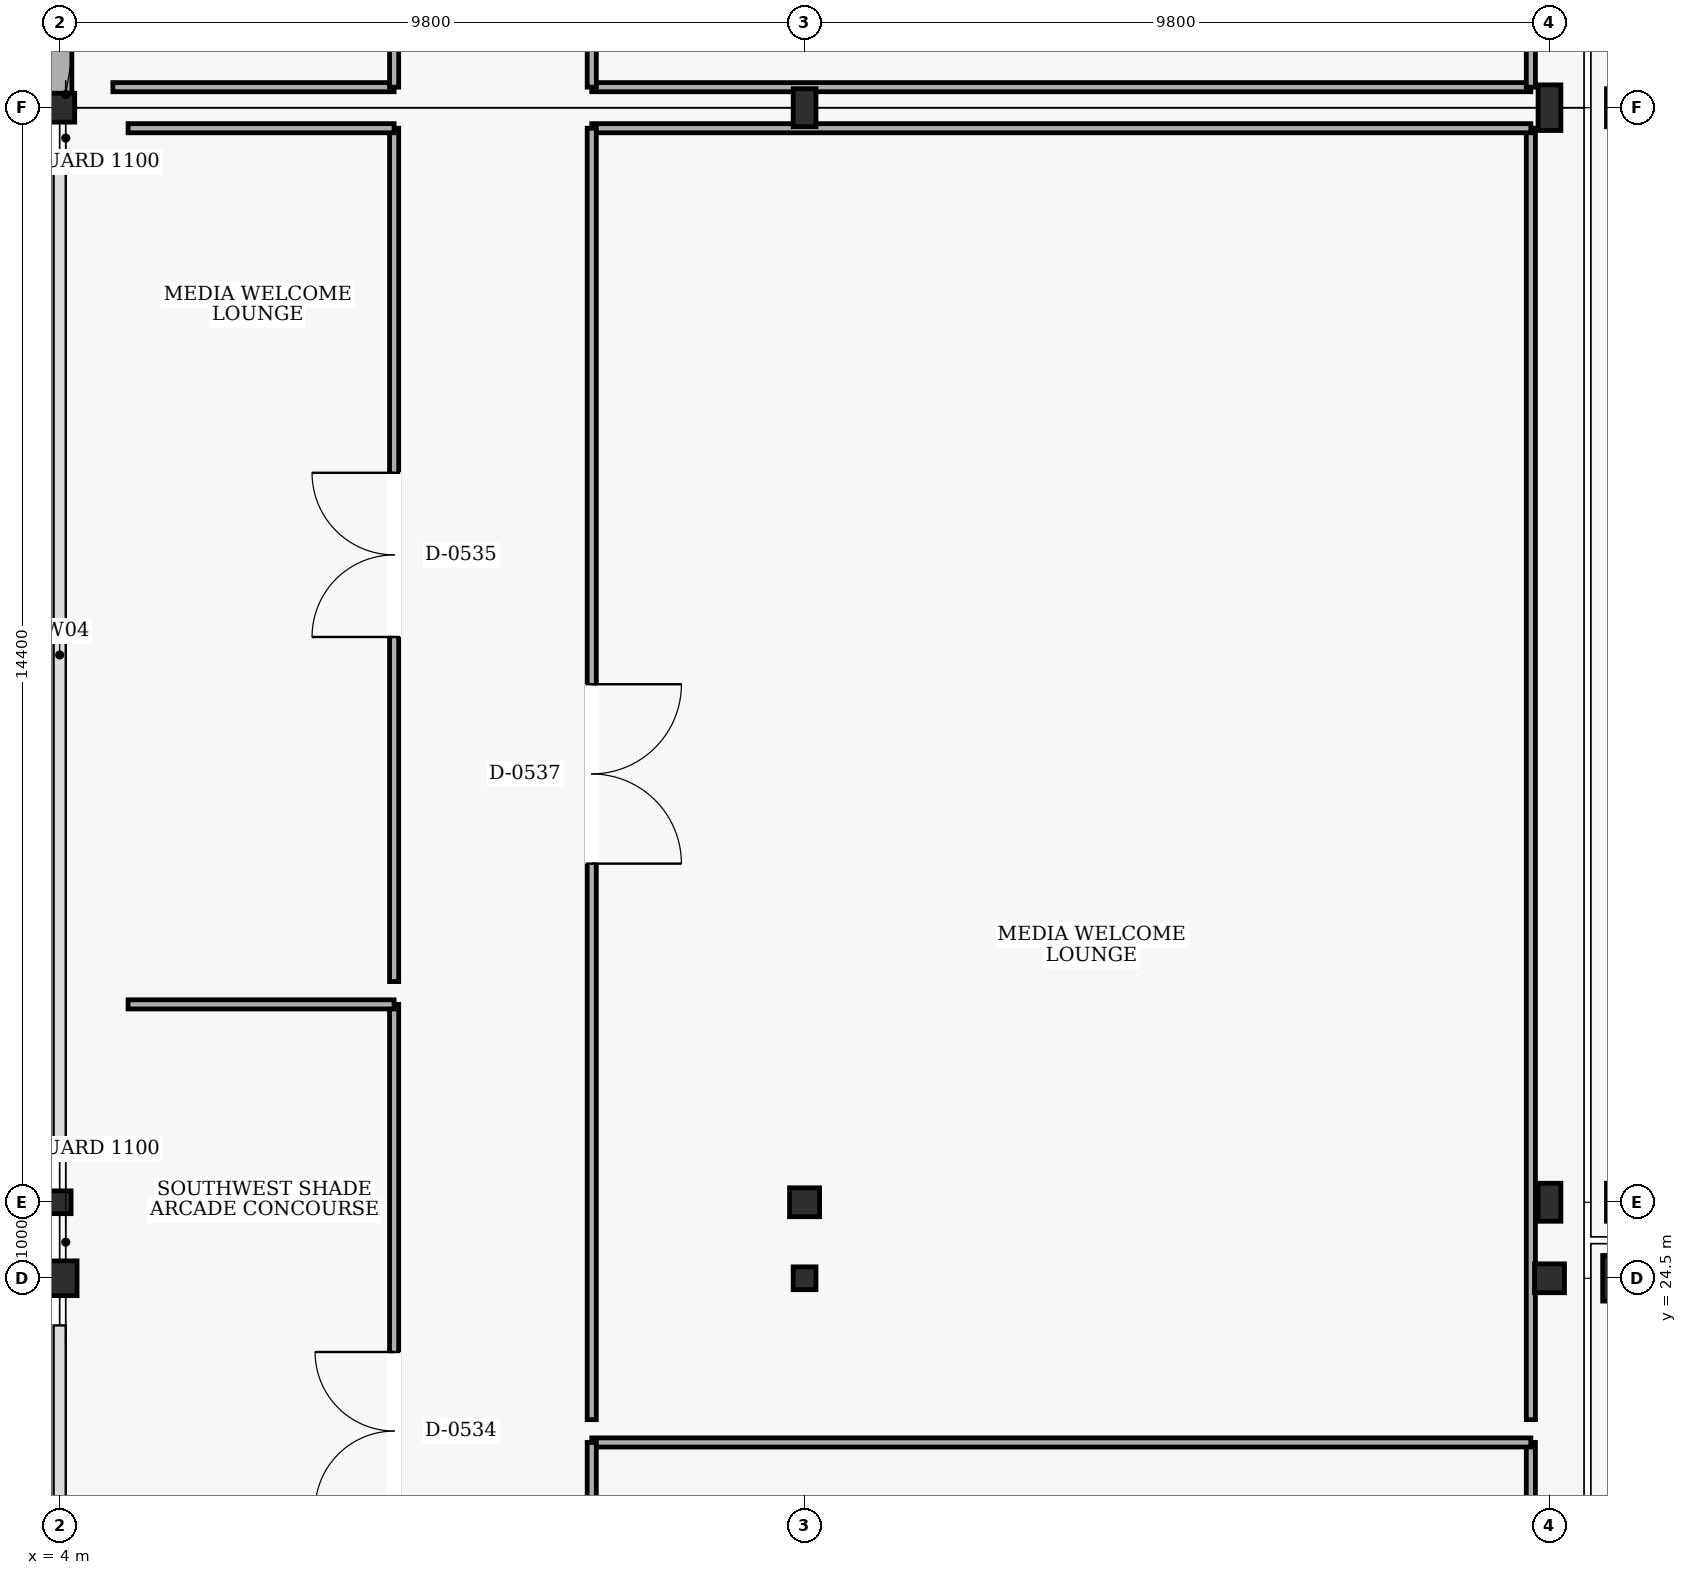
"""IFC4 building model, lengths in metres.
Left out: names, types, materials, properties, quantities, classifications, styles, units other than length and angle.
Written with IfcOpenShell. Run it as: python <this file> out.ifc"""

import sys

from ifc_helpers import new_model, si_unit, direction, frame, frame_2d, origin, origin_2d, place, context, subcontext, project, spatial, rectangle, hollow_rectangle, hollow_circle, i_section, extrude, element, fill, save


model = new_model("IFC4")
c1 = context("Model", 3, precision=1e-05, world=origin(), true_north=direction((0.0, 1.0)))
c2 = subcontext(c1, "Body", "Model", "MODEL_VIEW")
j1 = project(units=[si_unit("LENGTHUNIT", "METRE"), si_unit("PLANEANGLEUNIT", "RADIAN")], contexts=[c1])
p1 = place(None, origin())
s1 = spatial("IfcSite", under=j1, at=p1, CompositionType="ELEMENT")
p2 = place(p1, origin())
s2 = spatial("IfcBuilding", under=s1, at=p2, CompositionType="ELEMENT")
p3 = place(p2, frame((0.0, 0.0, 5.4)))
s3 = spatial("IfcBuildingStorey", under=s2, at=p3, CompositionType="ELEMENT", Elevation=5.4)
p4 = place(p3, frame((4.0, 24.5, 0.0), z_axis=(0.0, 0.0, 1.0), x_axis=(1.0, 0.0, 0.0)))
e1 = element("IfcColumn", 1, at=p4, inside=s3, PredefinedType="COLUMN", context=c2, shape_type="SweptSolid", body=[
    extrude(hollow_circle(Radius=0.229, WallThickness=0.02, at=origin_2d()), origin(), (0.0, 0.0, 1.0), 4.8),
])
p5 = place(p3, frame((4.0, 25.5, 0.0), z_axis=(0.0, 0.0, 1.0), x_axis=(1.0, 0.0, 0.0)))
e2 = element("IfcColumn", 2, at=p5, inside=s3, PredefinedType="COLUMN", context=c2, shape_type="SweptSolid", body=[
    extrude(hollow_rectangle(XDim=0.3, YDim=0.3, WallThickness=0.016, at=origin_2d()), origin(), (0.0, 0.0, 1.0), 4.8),
])
p6 = place(p3, frame((4.0, 39.9, 0.0), z_axis=(0.0, 0.0, 1.0), x_axis=(1.0, 0.0, 0.0)))
e3 = element("IfcColumn", 3, at=p6, inside=s3, PredefinedType="COLUMN", context=c2, shape_type="SweptSolid", body=[
    extrude(i_section(OverallWidth=0.395, OverallDepth=0.38, WebThickness=0.019, FlangeThickness=0.03, at=origin_2d()), origin(), (0.0, 0.0, 1.0), 4.8),
])
p7 = place(p3, frame((13.8, 24.5, 0.0), z_axis=(0.0, 0.0, 1.0), x_axis=(1.0, 0.0, 0.0)))
e4 = element("IfcColumn", 4, at=p7, inside=s3, PredefinedType="COLUMN", context=c2, shape_type="SweptSolid", body=[
    extrude(hollow_rectangle(XDim=0.3, YDim=0.3, WallThickness=0.016, at=origin_2d()), origin(), (0.0, 0.0, 1.0), 4.8),
])
p8 = place(p3, frame((13.8, 25.5, 0.0), z_axis=(0.0, 0.0, 1.0), x_axis=(1.0, 0.0, 0.0)))
e5 = element("IfcColumn", 5, at=p8, inside=s3, PredefinedType="COLUMN", context=c2, shape_type="SweptSolid", body=[
    extrude(i_section(OverallWidth=0.395, OverallDepth=0.38, WebThickness=0.019, FlangeThickness=0.03, at=origin_2d()), origin(), (0.0, 0.0, 1.0), 4.8),
])
p9 = place(p3, frame((13.8, 39.9, 0.0), z_axis=(0.0, 0.0, 1.0), x_axis=(1.0, 0.0, 0.0)))
e6 = element("IfcColumn", 6, at=p9, inside=s3, PredefinedType="COLUMN", context=c2, shape_type="SweptSolid", body=[
    extrude(i_section(OverallWidth=0.3, OverallDepth=0.5, WebThickness=0.014, FlangeThickness=0.028, at=origin_2d()), origin(), (0.0, 0.0, 1.0), 4.8),
])
p10 = place(p3, frame((23.6, 24.5, 0.0), z_axis=(0.0, 0.0, 1.0), x_axis=(1.0, 0.0, 0.0)))
e7 = element("IfcColumn", 7, at=p10, inside=s3, PredefinedType="COLUMN", context=c2, shape_type="SweptSolid", body=[
    extrude(i_section(OverallWidth=0.395, OverallDepth=0.38, WebThickness=0.019, FlangeThickness=0.03, at=origin_2d()), origin(), (0.0, 0.0, 1.0), 4.8),
])
p11 = place(p3, frame((23.6, 25.5, 0.0), z_axis=(0.0, 0.0, 1.0), x_axis=(1.0, 0.0, 0.0)))
e8 = element("IfcColumn", 8, at=p11, inside=s3, PredefinedType="COLUMN", context=c2, shape_type="SweptSolid", body=[
    extrude(i_section(OverallWidth=0.3, OverallDepth=0.5, WebThickness=0.014, FlangeThickness=0.028, at=origin_2d()), origin(), (0.0, 0.0, 1.0), 4.8),
])
p12 = place(p3, frame((23.6, 39.9, 0.0), z_axis=(0.0, 0.0, 1.0), x_axis=(1.0, 0.0, 0.0)))
e9 = element("IfcColumn", 9, at=p12, inside=s3, PredefinedType="COLUMN", context=c2, shape_type="SweptSolid", body=[
    extrude(i_section(OverallWidth=0.3, OverallDepth=0.6, WebThickness=0.015, FlangeThickness=0.03, at=origin_2d()), origin(), (0.0, 0.0, 1.0), 4.8),
])
p13 = place(p3, frame((24.6, 24.5, 0.0), z_axis=(0.0, 0.0, 1.0), x_axis=(1.0, 0.0, 0.0)))
e10 = element("IfcColumn", 10, at=p13, inside=s3, PredefinedType="COLUMN", context=c2, shape_type="SweptSolid", body=[
    extrude(rectangle(XDim=0.6, YDim=0.6, at=origin_2d()), origin(), (0.0, 0.0, 1.0), 4.8),
])
for number, where, z_axis, x_axis in (
    (11, (24.6, 25.5, 0.0), (0.0, 0.0, 1.0), (1.0, 0.0, 0.0)),
    (12, (24.6, 39.9, 0.0), (0.0, 0.0, 1.0), (1.0, 0.0, 0.0)),
):
    element("IfcColumn", number, at=place(p3, frame(where, z_axis=z_axis, x_axis=x_axis)), inside=s3, PredefinedType="COLUMN", context=c2, shape_type="SweptSolid", body=[
        extrude(rectangle(XDim=0.5, YDim=0.5, at=origin_2d()), origin(), (0.0, 0.0, 1.0), 4.8),
    ])
p14 = place(p3, frame((4.0, 40.085, 0.0), z_axis=(0.0, 0.0, 1.0), x_axis=(0.0, 1.0, 0.0)))
e13 = element("IfcWall", 13, at=p14, inside=s3, PredefinedType="SOLIDWALL", context=c2, shape_type="SweptSolid", body=[
    extrude(rectangle(XDim=6.77, YDim=0.32, at=frame_2d((3.385, 0.0))), origin(), (0.0, 0.0, 1.0), 3.78),
])
p15 = place(p14, frame((2.785, 0.0, 0.9)))
e14 = element("IfcOpeningElement", 14, at=p15, cuts=e13, PredefinedType="OPENING", context=c2, shape_type="SweptSolid", body=[
    extrude(rectangle(XDim=1.2, YDim=1.5, at=frame_2d((0.6, 0.75))), frame((0.0, 0.17, 0.0), z_axis=(0.0, -1.0, 0.0), x_axis=(1.0, 0.0, 0.0)), (0.0, 0.0, 1.0), 0.34),
])
p16 = place(p3, frame((8.4, 16.877, 0.0), z_axis=(0.0, 0.0, 1.0), x_axis=(0.0, 1.0, 0.0)))
e15 = element("IfcWall", 15, at=p16, inside=s3, PredefinedType="PARTITIONING", context=c2, shape_type="SweptSolid", body=[
    extrude(rectangle(XDim=11.227, YDim=0.12, at=frame_2d((5.613, 0.0))), origin(), (0.0, 0.0, 1.0), 4.5),
])
p17 = place(p16, frame((4.573, 0.0, 0.0)))
e16 = element("IfcOpeningElement", 16, at=p17, cuts=e15, PredefinedType="OPENING", context=c2, shape_type="SweptSolid", body=[
    extrude(rectangle(XDim=2.08, YDim=2.35, at=frame_2d((1.04, 1.175))), frame((0.0, 0.07, 0.0), z_axis=(0.0, -1.0, 0.0), x_axis=(1.0, 0.0, 0.0)), (0.0, 0.0, 1.0), 0.14),
])
p18 = place(p3, frame((8.4, 28.103, 0.0), z_axis=(0.0, 0.0, 1.0), x_axis=(-1.0, 0.0, 0.0)))
e17 = element("IfcWall", 17, at=p18, inside=s3, PredefinedType="PARTITIONING", context=c2, shape_type="SweptSolid", body=[
    extrude(rectangle(XDim=3.5, YDim=0.12, at=frame_2d((1.75, 0.0))), origin(), (0.0, 0.0, 1.0), 4.5),
])
p19 = place(p3, frame((8.4, 28.403, 0.0), z_axis=(0.0, 0.0, 1.0), x_axis=(0.0, 1.0, 0.0)))
e18 = element("IfcWall", 18, at=p19, inside=s3, PredefinedType="PARTITIONING", context=c2, shape_type="SweptSolid", body=[
    extrude(rectangle(XDim=11.227, YDim=0.12, at=frame_2d((5.613, 0.0))), origin(), (0.0, 0.0, 1.0), 4.5),
])
p20 = place(p19, frame((4.533, 0.0, 0.0)))
e19 = element("IfcOpeningElement", 19, at=p20, cuts=e18, PredefinedType="OPENING", context=c2, shape_type="SweptSolid", body=[
    extrude(rectangle(XDim=2.16, YDim=2.35, at=frame_2d((1.08, 1.175))), frame((0.0, 0.07, 0.0), z_axis=(0.0, -1.0, 0.0), x_axis=(1.0, 0.0, 0.0)), (0.0, 0.0, 1.0), 0.14),
])
p21 = place(p3, frame((8.4, 39.63, 0.0), z_axis=(0.0, 0.0, 1.0), x_axis=(-1.0, 0.0, 0.0)))
e20 = element("IfcWall", 20, at=p21, inside=s3, PredefinedType="PARTITIONING", context=c2, shape_type="SweptSolid", body=[
    extrude(rectangle(XDim=3.5, YDim=0.12, at=frame_2d((1.75, 0.0))), origin(), (0.0, 0.0, 1.0), 3.68),
])
p22 = place(p3, frame((23.355, 5.35, 0.0), z_axis=(0.0, 0.0, 1.0), x_axis=(0.0, 1.0, 0.0)))
e21 = element("IfcWall", 21, at=p22, inside=s3, PredefinedType="PARTITIONING", context=c2, shape_type="SweptSolid", body=[
    extrude(rectangle(XDim=16.99, YDim=0.12, at=frame_2d((8.495, 0.0))), origin(), (0.0, 0.0, 1.0), 3.78),
])
p23 = place(p3, frame((23.355, 22.34, 0.0), z_axis=(0.0, 0.0, 1.0), x_axis=(-1.0, 0.0, 0.0)))
e22 = element("IfcWall", 22, at=p23, inside=s3, PredefinedType="PARTITIONING", context=c2, shape_type="SweptSolid", body=[
    extrude(rectangle(XDim=12.355, YDim=0.12, at=frame_2d((6.177, 0.0))), origin(), (0.0, 0.0, 1.0), 4.5),
])
p24 = place(p3, frame((11.0, 22.34, 0.0), z_axis=(0.0, 0.0, 1.0), x_axis=(0.0, -1.0, 0.0)))
e23 = element("IfcWall", 23, at=p24, inside=s3, PredefinedType="PARTITIONING", context=c2, shape_type="SweptSolid", body=[
    extrude(rectangle(XDim=16.99, YDim=0.12, at=frame_2d((8.495, 0.0))), origin(), (0.0, 0.0, 1.0), 4.5),
])
p25 = place(p24, frame((7.355, 0.0, 0.0)))
e24 = element("IfcOpeningElement", 24, at=p25, cuts=e23, PredefinedType="OPENING", context=c2, shape_type="SweptSolid", body=[
    extrude(rectangle(XDim=2.28, YDim=2.4, at=frame_2d((1.14, 1.2))), frame((0.0, 0.07, 0.0), z_axis=(0.0, -1.0, 0.0), x_axis=(1.0, 0.0, 0.0)), (0.0, 0.0, 1.0), 0.14),
])
p26 = place(p3, frame((23.355, 22.64, 0.0), z_axis=(0.0, 0.0, 1.0), x_axis=(0.0, 1.0, 0.0)))
e25 = element("IfcWall", 25, at=p26, inside=s3, PredefinedType="PARTITIONING", context=c2, shape_type="SweptSolid", body=[
    extrude(rectangle(XDim=16.99, YDim=0.12, at=frame_2d((8.495, 0.0))), origin(), (0.0, 0.0, 1.0), 3.78),
])
p27 = place(p3, frame((23.355, 39.63, 0.0), z_axis=(0.0, 0.0, 1.0), x_axis=(-1.0, 0.0, 0.0)))
e26 = element("IfcWall", 26, at=p27, inside=s3, PredefinedType="PARTITIONING", context=c2, shape_type="SweptSolid", body=[
    extrude(rectangle(XDim=12.355, YDim=0.12, at=frame_2d((6.177, 0.0))), origin(), (0.0, 0.0, 1.0), 3.53),
])
p28 = place(p3, frame((11.0, 39.63, 0.0), z_axis=(0.0, 0.0, 1.0), x_axis=(0.0, -1.0, 0.0)))
e27 = element("IfcWall", 27, at=p28, inside=s3, PredefinedType="PARTITIONING", context=c2, shape_type="SweptSolid", body=[
    extrude(rectangle(XDim=16.99, YDim=0.12, at=frame_2d((8.495, 0.0))), origin(), (0.0, 0.0, 1.0), 4.5),
])
p29 = place(p28, frame((7.315, 0.0, 0.0)))
e28 = element("IfcOpeningElement", 28, at=p29, cuts=e27, PredefinedType="OPENING", context=c2, shape_type="SweptSolid", body=[
    extrude(rectangle(XDim=2.36, YDim=2.4, at=frame_2d((1.18, 1.2))), frame((0.0, 0.07, 0.0), z_axis=(0.0, -1.0, 0.0), x_axis=(1.0, 0.0, 0.0)), (0.0, 0.0, 1.0), 0.14),
])
p30 = place(p3, frame((4.7, 40.17, 0.0), z_axis=(0.0, 0.0, 1.0), x_axis=(1.0, 0.0, 0.0)))
e29 = element("IfcWall", 29, at=p30, inside=s3, PredefinedType="PARTITIONING", context=c2, shape_type="SweptSolid", body=[
    extrude(rectangle(XDim=3.7, YDim=0.12, at=frame_2d((1.85, 0.0))), origin(), (0.0, 0.0, 1.0), 3.68),
])
p31 = place(p3, frame((8.4, 40.17, 0.0), z_axis=(0.0, 0.0, 1.0), x_axis=(0.0, 1.0, 0.0)))
e30 = element("IfcWall", 30, at=p31, inside=s3, PredefinedType="PARTITIONING", context=c2, shape_type="SweptSolid", body=[
    extrude(rectangle(XDim=11.445, YDim=0.12, at=frame_2d((5.723, 0.0))), origin(), (0.0, 0.0, 1.0), 4.5),
])
p32 = place(p31, frame((5.262, 0.0, 0.0)))
e31 = element("IfcOpeningElement", 31, at=p32, cuts=e30, PredefinedType="OPENING", context=c2, shape_type="SweptSolid", body=[
    extrude(rectangle(XDim=0.92, YDim=2.1, at=frame_2d((0.46, 1.05))), frame((0.0, 0.07, 0.0), z_axis=(0.0, -1.0, 0.0), x_axis=(1.0, 0.0, 0.0)), (0.0, 0.0, 1.0), 0.14),
])
p33 = place(p3, frame((11.0, 40.17, 0.0), z_axis=(0.0, 0.0, 1.0), x_axis=(1.0, 0.0, 0.0)))
e32 = element("IfcWall", 32, at=p33, inside=s3, PredefinedType="PARTITIONING", context=c2, shape_type="SweptSolid", body=[
    extrude(rectangle(XDim=12.355, YDim=0.12, at=frame_2d((6.177, 0.0))), origin(), (0.0, 0.0, 1.0), 3.53),
])
p34 = place(p3, frame((23.355, 40.17, 0.0), z_axis=(0.0, 0.0, 1.0), x_axis=(0.0, 1.0, 0.0)))
e33 = element("IfcWall", 33, at=p34, inside=s3, PredefinedType="PARTITIONING", context=c2, shape_type="SweptSolid", body=[
    extrude(rectangle(XDim=11.5, YDim=0.12, at=frame_2d((5.75, 0.0))), origin(), (0.0, 0.0, 1.0), 3.78),
])
p35 = place(p3, frame((11.0, 51.67, 0.0), z_axis=(0.0, 0.0, 1.0), x_axis=(0.0, -1.0, 0.0)))
e34 = element("IfcWall", 34, at=p35, inside=s3, PredefinedType="PARTITIONING", context=c2, shape_type="SweptSolid", body=[
    extrude(rectangle(XDim=11.5, YDim=0.12, at=frame_2d((5.75, 0.0))), origin(), (0.0, 0.0, 1.0), 4.5),
])
p36 = place(p35, frame((5.25, 0.0, 0.0)))
e35 = element("IfcOpeningElement", 35, at=p36, cuts=e34, PredefinedType="OPENING", context=c2, shape_type="SweptSolid", body=[
    extrude(rectangle(XDim=1.0, YDim=2.1, at=frame_2d((0.5, 1.05))), frame((0.0, 0.07, 0.0), z_axis=(0.0, -1.0, 0.0), x_axis=(1.0, 0.0, 0.0)), (0.0, 0.0, 1.0), 0.14),
])
p37 = place(p17, origin())
e36 = element("IfcDoor", 36, at=p37, inside=s3, OperationType="DOUBLE_DOOR_SINGLE_SWING", PredefinedType="DOOR", context=c2, shape_type="SweptSolid", body=[
    extrude(rectangle(XDim=2.08, YDim=2.35, at=frame_2d((1.04, 1.175))), frame((0.0, 0.025, 0.0), z_axis=(0.0, -1.0, 0.0), x_axis=(1.0, 0.0, 0.0)), (0.0, 0.0, 1.0), 0.05),
])
fill(e16, e36)
p38 = place(p20, origin())
e37 = element("IfcDoor", 37, at=p38, inside=s3, OperationType="DOUBLE_DOOR_SINGLE_SWING", PredefinedType="DOOR", context=c2, shape_type="SweptSolid", body=[
    extrude(rectangle(XDim=2.16, YDim=2.35, at=frame_2d((1.08, 1.175))), frame((0.0, 0.025, 0.0), z_axis=(0.0, -1.0, 0.0), x_axis=(1.0, 0.0, 0.0)), (0.0, 0.0, 1.0), 0.05),
])
fill(e19, e37)
p39 = place(p29, origin())
e38 = element("IfcDoor", 38, at=p39, inside=s3, OperationType="DOUBLE_DOOR_SINGLE_SWING", PredefinedType="DOOR", context=c2, shape_type="SweptSolid", body=[
    extrude(rectangle(XDim=2.36, YDim=2.4, at=frame_2d((1.18, 1.2))), frame((0.0, 0.025, 0.0), z_axis=(0.0, -1.0, 0.0), x_axis=(1.0, 0.0, 0.0)), (0.0, 0.0, 1.0), 0.05),
])
fill(e28, e38)
save(model, sys.argv[1])
